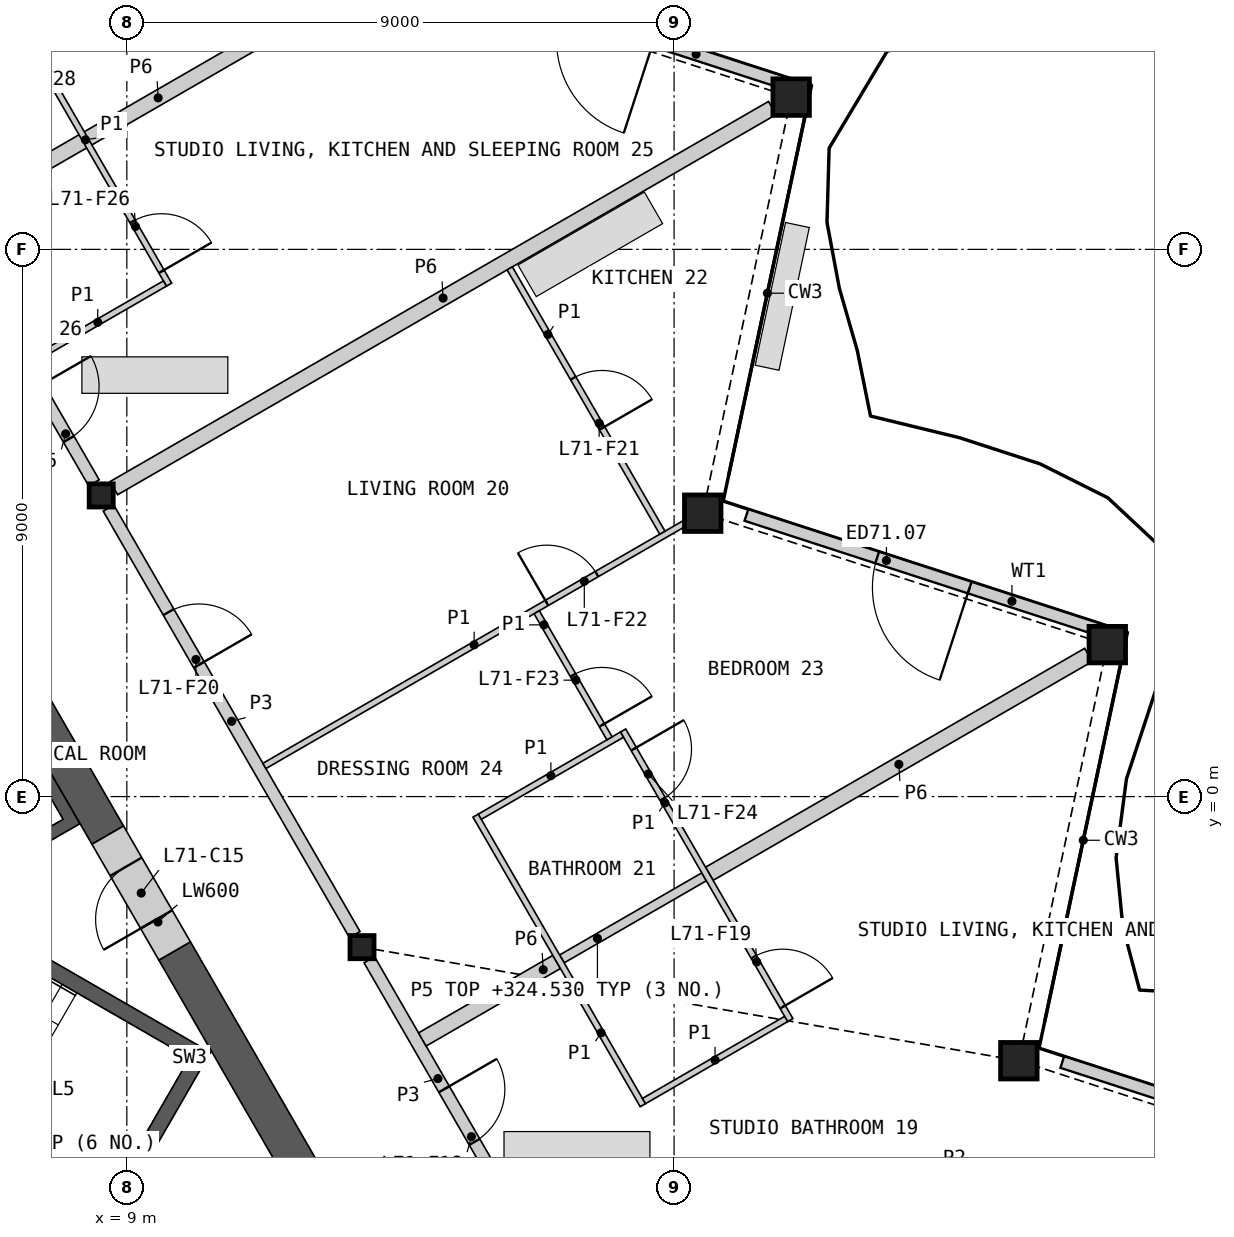
"""IFC4 building model, lengths in metres.
Left out: names, types, materials, properties, quantities, classifications, styles, units other than length and angle.
Written with IfcOpenShell. Run it as: python <this file> out.ifc"""

import sys

from ifc_helpers import new_model, si_unit, direction, frame, frame_2d, origin, origin_2d, place, context, subcontext, project, spatial, polyline, rectangle, hollow_rectangle, i_section, outline, extrude, element, fill, save


model = new_model("IFC4")
c1 = context("Model", 3, precision=1e-05, world=origin(), true_north=direction((0.0, 1.0)))
c2 = subcontext(c1, "Body", "Model", "MODEL_VIEW")
j1 = project(units=[si_unit("LENGTHUNIT", "METRE"), si_unit("PLANEANGLEUNIT", "RADIAN")], contexts=[c1])
p1 = place(None, origin())
s1 = spatial("IfcSite", under=j1, at=p1, CompositionType="ELEMENT")
p2 = place(p1, origin())
s2 = spatial("IfcBuilding", under=s1, at=p2, CompositionType="ELEMENT")
p3 = place(p2, frame((0.0, 0.0, 322.2)))
s3 = spatial("IfcBuildingStorey", under=s2, at=p3, CompositionType="ELEMENT", Elevation=322.2)
for number, where, z_axis, x_axis in (
    (1, (23.67, -4.344, 0.0), (0.0, 0.0, 1.0), (1.0, 0.0, 0.0)),
    (2, (25.125, 2.499, 0.0), (0.0, 0.0, 1.0), (1.0, 0.0, 0.0)),
    (3, (18.471, 4.661, 0.0), (0.0, 0.0, 1.0), (1.0, 0.0, 0.0)),
    (4, (19.926, 11.504, 0.0), (0.0, 0.0, 1.0), (1.0, 0.0, 0.0)),
):
    element("IfcColumn", number, at=place(p3, frame(where, z_axis=z_axis, x_axis=x_axis)), inside=s3, PredefinedType="COLUMN", context=c2, shape_type="SweptSolid", body=[
        extrude(hollow_rectangle(XDim=0.6, YDim=0.6, WallThickness=0.04, at=origin_2d()), origin(), (0.0, 0.0, 1.0), 3.4),
    ])
for number, where, z_axis, x_axis in (
    (5, (12.868, -2.476, 0.0), (0.0, 0.0, 1.0), (1.0, 0.0, 0.0)),
    (6, (8.578, 4.953, 0.0), (0.0, 0.0, 1.0), (1.0, 0.0, 0.0)),
):
    element("IfcColumn", number, at=place(p3, frame(where, z_axis=z_axis, x_axis=x_axis)), inside=s3, PredefinedType="COLUMN", context=c2, shape_type="SweptSolid", body=[
        extrude(i_section(OverallWidth=0.396, OverallDepth=0.381, WebThickness=0.019, FlangeThickness=0.03, at=origin_2d()), origin(), (0.0, 0.0, 1.0), 3.4),
    ])
p4 = place(p3, frame((30.207, -6.258, 0.0), z_axis=(0.0, 0.0, 1.0), x_axis=(-0.951056631566, 0.309016639608, 0.0)))
e7 = element("IfcWall", 7, at=p4, inside=s3, PredefinedType="SOLIDWALL", context=c2, shape_type="SweptSolid", body=[
    extrude(rectangle(XDim=6.122, YDim=0.2, at=frame_2d((3.061, 0.0))), origin(), (0.0, 0.0, 1.0), 2.488),
])
p5 = place(p4, frame((2.261, 0.0, 0.0)))
e8 = element("IfcOpeningElement", 8, at=p5, cuts=e7, PredefinedType="OPENING", context=c2, shape_type="SweptSolid", body=[
    extrude(rectangle(XDim=1.6, YDim=2.25, at=frame_2d((0.8, 1.125))), frame((0.0, 0.11, 0.0), z_axis=(0.0, -1.0, 0.0), x_axis=(1.0, 0.0, 0.0)), (0.0, 0.0, 1.0), 0.22),
])
p6 = place(p3, frame((25.012, 2.739, 0.0), z_axis=(0.0, 0.0, 1.0), x_axis=(-0.951056631566, 0.309016639608, 0.0)))
e9 = element("IfcWall", 9, at=p6, inside=s3, PredefinedType="SOLIDWALL", context=c2, shape_type="SweptSolid", body=[
    extrude(rectangle(XDim=6.122, YDim=0.2, at=frame_2d((3.061, 0.0))), origin(), (0.0, 0.0, 1.0), 2.488),
])
p7 = place(p6, frame((2.261, 0.0, 0.0)))
e10 = element("IfcOpeningElement", 10, at=p7, cuts=e9, PredefinedType="OPENING", context=c2, shape_type="SweptSolid", body=[
    extrude(rectangle(XDim=1.6, YDim=2.25, at=frame_2d((0.8, 1.125))), frame((0.0, 0.11, 0.0), z_axis=(0.0, -1.0, 0.0), x_axis=(1.0, 0.0, 0.0)), (0.0, 0.0, 1.0), 0.22),
])
p8 = place(p3, frame((19.817, 11.737, 0.0), z_axis=(0.0, 0.0, 1.0), x_axis=(-0.951056631566, 0.309016639608, 0.0)))
e11 = element("IfcWall", 11, at=p8, inside=s3, PredefinedType="SOLIDWALL", context=c2, shape_type="SweptSolid", body=[
    extrude(rectangle(XDim=6.122, YDim=0.2, at=frame_2d((3.061, 0.0))), origin(), (0.0, 0.0, 1.0), 2.488),
])
p9 = place(p8, frame((2.261, 0.0, 0.0)))
e12 = element("IfcOpeningElement", 12, at=p9, cuts=e11, PredefinedType="OPENING", context=c2, shape_type="SweptSolid", body=[
    extrude(rectangle(XDim=1.6, YDim=2.25, at=frame_2d((0.8, 1.125))), frame((0.0, 0.11, 0.0), z_axis=(0.0, -1.0, 0.0), x_axis=(1.0, 0.0, 0.0)), (0.0, 0.0, 1.0), 0.22),
])
p10 = place(p3, origin())
e13 = element("IfcWall", 13, at=p10, inside=s3, PredefinedType="SHEAR", context=c2, shape_type="SweptSolid", body=[
    extrude(outline(polyline([(1.561, 6.097), (3.731, 7.35), (8.231, -0.444), (6.061, -1.697), (5.96, -1.524), (7.952, -0.374), (6.952, 1.358), (4.96, 0.208), (4.861, 0.381), (6.852, 1.531), (5.852, 3.263), (3.861, 2.113), (3.76, 2.287), (5.752, 3.437), (4.752, 5.169), (2.76, 4.019), (2.66, 4.192), (4.652, 5.342), (3.652, 7.074), (1.66, 5.924), (1.561, 6.097)])), origin(), (0.0, 0.0, 1.0), 3.1),
])
p11 = place(p3, origin())
e14 = element("IfcWall", 14, at=p11, inside=s3, PredefinedType="SHEAR", context=c2, shape_type="SweptSolid", body=[
    extrude(outline(polyline([(3.763, -3.956), (8.83, -6.881), (8.738, -6.539), (3.888, -3.739), (3.763, -3.956)])), origin(), (0.0, 0.0, 1.0), 3.1),
])
p12 = place(p3, origin())
e15 = element("IfcWall", 15, at=p12, inside=s3, PredefinedType="SHEAR", context=c2, shape_type="SweptSolid", body=[
    extrude(outline(polyline([(8.83, -6.881), (10.374, -4.206), (10.032, -4.298), (8.738, -6.539), (8.83, -6.881)])), origin(), (0.0, 0.0, 1.0), 3.1),
])
p13 = place(p3, origin())
e16 = element("IfcWall", 16, at=p13, inside=s3, PredefinedType="SHEAR", context=c2, shape_type="SweptSolid", body=[
    extrude(outline(polyline([(10.032, -4.298), (10.374, -4.206), (5.307, -1.281), (5.182, -1.498), (10.032, -4.298)])), origin(), (0.0, 0.0, 1.0), 3.1),
])
p14 = place(p3, frame((8.686, -0.634, 0.0), z_axis=(0.0, 0.0, 1.0), x_axis=(-0.500004601921, 0.866022746848, 0.0)))
e17 = element("IfcWall", 17, at=p14, inside=s3, PredefinedType="SHEAR", context=c2, shape_type="SweptSolid", body=[
    extrude(rectangle(XDim=16.853, YDim=0.6, at=frame_2d((8.426, 0.0))), origin(), (0.0, 0.0, 1.0), 3.1),
])
p15 = place(p3, frame((12.221, -6.756, 0.0), z_axis=(0.0, 0.0, 1.0), x_axis=(-0.50000604952, 0.866021911064, 0.0)))
e18 = element("IfcWall", 18, at=p15, inside=s3, PredefinedType="SHEAR", context=c2, shape_type="SweptSolid", body=[
    extrude(rectangle(XDim=4.869, YDim=0.6, at=frame_2d((2.434, 0.0))), origin(), (0.0, 0.0, 1.0), 3.1),
])
p16 = place(p3, frame((9.786, -2.539, 0.0), z_axis=(0.0, 0.0, 1.0), x_axis=(-0.499981787252, 0.866035918664, 0.0)))
e19 = element("IfcWall", 19, at=p16, inside=s3, PredefinedType="SHEAR", context=c2, shape_type="SweptSolid", body=[
    extrude(rectangle(XDim=2.2, YDim=0.6, at=frame_2d((1.1, 0.0))), origin(), (0.0, 0.0, 1.0), 3.1),
])
p17 = place(p16, frame((0.6, 0.0, 0.0)))
e20 = element("IfcOpeningElement", 20, at=p17, cuts=e19, PredefinedType="OPENING", context=c2, shape_type="SweptSolid", body=[
    extrude(rectangle(XDim=1.0, YDim=2.1, at=frame_2d((0.5, 1.05))), frame((0.0, 0.31, 0.0), z_axis=(0.0, -1.0, 0.0), x_axis=(1.0, 0.0, 0.0)), (0.0, 0.0, 1.0), 0.62),
])
p18 = place(p3, frame((8.786, 5.073, 0.0), z_axis=(0.0, 0.0, 1.0), x_axis=(0.86602139559, 0.500006942333, 0.0)))
e21 = element("IfcWall", 21, at=p18, inside=s3, PredefinedType="PARTITIONING", context=c2, shape_type="SweptSolid", body=[
    extrude(rectangle(XDim=12.505, YDim=0.25, at=frame_2d((6.252, 0.0))), origin(), (0.0, 0.0, 1.0), 2.33),
])
p19 = place(p3, frame((4.409, 12.174, 0.0), z_axis=(0.0, 0.0, 1.0), x_axis=(0.499984266882, -0.866034487114, 0.0)))
e22 = element("IfcWall", 22, at=p19, inside=s3, PredefinedType="PARTITIONING", context=c2, shape_type="SweptSolid", body=[
    extrude(rectangle(XDim=8.099, YDim=0.2, at=frame_2d((4.049, 0.0))), origin(), (0.0, 0.0, 1.0), 3.1),
])
p20 = place(p19, frame((6.269, 0.0, 0.0)))
e23 = element("IfcOpeningElement", 23, at=p20, cuts=e22, PredefinedType="OPENING", context=c2, shape_type="SweptSolid", body=[
    extrude(rectangle(XDim=1.0, YDim=2.1, at=frame_2d((0.5, 1.05))), frame((0.0, 0.11, 0.0), z_axis=(0.0, -1.0, 0.0), x_axis=(1.0, 0.0, 0.0)), (0.0, 0.0, 1.0), 0.22),
])
p21 = place(p19, frame((1.164, 0.0, 0.0)))
e24 = element("IfcOpeningElement", 24, at=p21, cuts=e22, PredefinedType="OPENING", context=c2, shape_type="SweptSolid", body=[
    extrude(rectangle(XDim=1.0, YDim=2.1, at=frame_2d((0.5, 1.05))), frame((0.0, 0.11, 0.0), z_axis=(0.0, -1.0, 0.0), x_axis=(1.0, 0.0, 0.0)), (0.0, 0.0, 1.0), 0.22),
])
p22 = place(p3, frame((8.698, 4.745, 0.0), z_axis=(0.0, 0.0, 1.0), x_axis=(0.499984266882, -0.866034487114, 0.0)))
e25 = element("IfcWall", 25, at=p22, inside=s3, PredefinedType="PARTITIONING", context=c2, shape_type="SweptSolid", body=[
    extrude(rectangle(XDim=8.099, YDim=0.2, at=frame_2d((4.049, 0.0))), origin(), (0.0, 0.0, 1.0), 3.1),
])
p23 = place(p22, frame((1.976, 0.0, 0.0)))
e26 = element("IfcOpeningElement", 26, at=p23, cuts=e25, PredefinedType="OPENING", context=c2, shape_type="SweptSolid", body=[
    extrude(rectangle(XDim=1.0, YDim=2.1, at=frame_2d((0.5, 1.05))), frame((0.0, 0.11, 0.0), z_axis=(0.0, -1.0, 0.0), x_axis=(1.0, 0.0, 0.0)), (0.0, 0.0, 1.0), 0.22),
])
p24 = place(p3, frame((6.068, 9.501, 0.0), z_axis=(0.0, 0.0, 1.0), x_axis=(0.866022671543, 0.50000473235, 0.0)))
e27 = element("IfcWall", 27, at=p24, inside=s3, PredefinedType="PARTITIONING", context=c2, shape_type="SweptSolid", body=[
    extrude(rectangle(XDim=7.961, YDim=0.25, at=frame_2d((3.98, 0.0))), origin(), (0.0, 0.0, 1.0), 2.33),
])
p25 = place(p3, frame((18.58, -1.27, 0.0), z_axis=(0.0, 0.0, 1.0), x_axis=(0.866024647952, 0.500001309137, 0.0)))
e28 = element("IfcWall", 28, at=p25, inside=s3, PredefinedType="PARTITIONING", context=c2, shape_type="SweptSolid", body=[
    extrude(rectangle(XDim=7.2, YDim=0.25, at=frame_2d((3.6, 0.0))), origin(), (0.0, 0.0, 1.0), 2.33),
])
p26 = place(p3, frame((12.988, -2.684, 0.0), z_axis=(0.0, 0.0, 1.0), x_axis=(0.49999094734, -0.866030630277, 0.0)))
e29 = element("IfcWall", 29, at=p26, inside=s3, PredefinedType="PARTITIONING", context=c2, shape_type="SweptSolid", body=[
    extrude(rectangle(XDim=4.513, YDim=0.2, at=frame_2d((2.256, 0.0))), origin(), (0.0, 0.0, 1.0), 3.1),
])
p27 = place(p26, frame((2.459, 0.0, 0.0)))
e30 = element("IfcOpeningElement", 30, at=p27, cuts=e29, PredefinedType="OPENING", context=c2, shape_type="SweptSolid", body=[
    extrude(rectangle(XDim=1.0, YDim=2.1, at=frame_2d((0.5, 1.05))), frame((0.0, 0.11, 0.0), z_axis=(0.0, -1.0, 0.0), x_axis=(1.0, 0.0, 0.0)), (0.0, 0.0, 1.0), 0.22),
])
p28 = place(p3, frame((13.86, -3.995, 0.0), z_axis=(0.0, 0.0, 1.0), x_axis=(0.866030925526, 0.499990435942, 0.0)))
e31 = element("IfcWall", 31, at=p28, inside=s3, PredefinedType="PARTITIONING", context=c2, shape_type="SweptSolid", body=[
    extrude(rectangle(XDim=2.55, YDim=0.25, at=frame_2d((1.275, 0.0))), origin(), (0.0, 0.0, 1.0), 2.33),
])
p29 = place(p3, frame((16.155, -2.67, 0.0), z_axis=(0.0, 0.0, 1.0), x_axis=(0.86599734893, 0.500048589285, 0.0)))
e32 = element("IfcWall", 32, at=p29, inside=s3, PredefinedType="PLUMBINGWALL", context=c2, shape_type="SweptSolid", body=[
    extrude(rectangle(XDim=2.7, YDim=0.15, at=frame_2d((1.35, 0.0))), origin(), (0.0, 0.0, 1.0), 2.33),
])
p30 = place(p3, frame((11.262, 0.504, 0.0), z_axis=(0.0, 0.0, 1.0), x_axis=(0.866020217342, 0.500008983073, 0.0)))
e33 = element("IfcWall", 33, at=p30, inside=s3, PredefinedType="PARTITIONING", context=c2, shape_type="SweptSolid", body=[
    extrude(rectangle(XDim=7.966, YDim=0.1, at=frame_2d((3.983, 0.0))), origin(), (0.0, 0.0, 1.0), 2.33),
])
p31 = place(p30, frame((5.362, 0.0, 0.0)))
e34 = element("IfcOpeningElement", 34, at=p31, cuts=e33, PredefinedType="OPENING", context=c2, shape_type="SweptSolid", body=[
    extrude(rectangle(XDim=0.95, YDim=2.1, at=frame_2d((0.475, 1.05))), frame((0.0, 0.06, 0.0), z_axis=(0.0, -1.0, 0.0), x_axis=(1.0, 0.0, 0.0)), (0.0, 0.0, 1.0), 0.12),
])
p32 = place(p3, frame((17.161, 1.087, 0.0), z_axis=(0.0, 0.0, 1.0), x_axis=(0.499996545922, -0.866027397988, 0.0)))
e35 = element("IfcWall", 35, at=p32, inside=s3, PredefinedType="PARTITIONING", context=c2, shape_type="SweptSolid", body=[
    extrude(rectangle(XDim=5.5, YDim=0.1, at=frame_2d((2.75, 0.0))), origin(), (0.0, 0.0, 1.0), 2.33),
])
p33 = place(p32, frame((4.3, 0.0, 0.0)))
e36 = element("IfcOpeningElement", 36, at=p33, cuts=e35, PredefinedType="OPENING", context=c2, shape_type="SweptSolid", body=[
    extrude(rectangle(XDim=0.95, YDim=2.1, at=frame_2d((0.475, 1.05))), frame((0.0, 0.06, 0.0), z_axis=(0.0, -1.0, 0.0), x_axis=(1.0, 0.0, 0.0)), (0.0, 0.0, 1.0), 0.12),
])
p34 = place(p32, frame((0.351, 0.0, 0.0)))
e37 = element("IfcOpeningElement", 37, at=p34, cuts=e35, PredefinedType="OPENING", context=c2, shape_type="SweptSolid", body=[
    extrude(rectangle(XDim=0.95, YDim=2.1, at=frame_2d((0.475, 1.05))), frame((0.0, 0.06, 0.0), z_axis=(0.0, -1.0, 0.0), x_axis=(1.0, 0.0, 0.0)), (0.0, 0.0, 1.0), 0.12),
])
p35 = place(p3, frame((14.736, -0.313, 0.0), z_axis=(0.0, 0.0, 1.0), x_axis=(0.49997732567, -0.866038494419, 0.0)))
e38 = element("IfcWall", 38, at=p35, inside=s3, PredefinedType="PARTITIONING", context=c2, shape_type="SweptSolid", body=[
    extrude(rectangle(XDim=5.5, YDim=0.1, at=frame_2d((2.75, 0.0))), origin(), (0.0, 0.0, 1.0), 2.33),
])
p36 = place(p3, frame((6.944, 13.183, 0.0), z_axis=(0.0, 0.0, 1.0), x_axis=(0.499996545922, -0.866027397988, 0.0)))
e39 = element("IfcWall", 39, at=p36, inside=s3, PredefinedType="PARTITIONING", context=c2, shape_type="SweptSolid", body=[
    extrude(rectangle(XDim=5.5, YDim=0.1, at=frame_2d((2.75, 0.0))), origin(), (0.0, 0.0, 1.0), 2.33),
])
p37 = place(p36, frame((4.3, 0.0, 0.0)))
e40 = element("IfcOpeningElement", 40, at=p37, cuts=e39, PredefinedType="OPENING", context=c2, shape_type="SweptSolid", body=[
    extrude(rectangle(XDim=0.95, YDim=2.1, at=frame_2d((0.475, 1.05))), frame((0.0, 0.06, 0.0), z_axis=(0.0, -1.0, 0.0), x_axis=(1.0, 0.0, 0.0)), (0.0, 0.0, 1.0), 0.12),
])
p38 = place(p36, frame((0.25, 0.0, 0.0)))
e41 = element("IfcOpeningElement", 41, at=p38, cuts=e39, PredefinedType="OPENING", context=c2, shape_type="SweptSolid", body=[
    extrude(rectangle(XDim=0.95, YDim=2.1, at=frame_2d((0.475, 1.05))), frame((0.0, 0.06, 0.0), z_axis=(0.0, -1.0, 0.0), x_axis=(1.0, 0.0, 0.0)), (0.0, 0.0, 1.0), 0.12),
])
p39 = place(p3, frame((15.297, 8.688, 0.0), z_axis=(0.0, 0.0, 1.0), x_axis=(0.499989096993, -0.866031698547, 0.0)))
e42 = element("IfcWall", 42, at=p39, inside=s3, PredefinedType="PARTITIONING", context=c2, shape_type="SweptSolid", body=[
    extrude(rectangle(XDim=5.02, YDim=0.1, at=frame_2d((2.51, 0.0))), origin(), (0.0, 0.0, 1.0), 2.33),
])
p40 = place(p39, frame((2.086, 0.0, 0.0)))
e43 = element("IfcOpeningElement", 43, at=p40, cuts=e42, PredefinedType="OPENING", context=c2, shape_type="SweptSolid", body=[
    extrude(rectangle(XDim=0.95, YDim=2.1, at=frame_2d((0.475, 1.05))), frame((0.0, 0.06, 0.0), z_axis=(0.0, -1.0, 0.0), x_axis=(1.0, 0.0, 0.0)), (0.0, 0.0, 1.0), 0.12),
])
p41 = place(p3, frame((17.505, -5.008, 0.0), z_axis=(0.0, 0.0, 1.0), x_axis=(0.866019956843, 0.50000943426, 0.0)))
e44 = element("IfcWall", 44, at=p41, inside=s3, PredefinedType="PARTITIONING", context=c2, shape_type="SweptSolid", body=[
    extrude(rectangle(XDim=2.7, YDim=0.1, at=frame_2d((1.35, 0.0))), origin(), (0.0, 0.0, 1.0), 2.33),
])
p42 = place(p3, frame((14.805, -0.331, 0.0), z_axis=(0.0, 0.0, 1.0), x_axis=(0.866059108428, 0.4999416173, 0.0)))
e45 = element("IfcWall", 45, at=p42, inside=s3, PredefinedType="PARTITIONING", context=c2, shape_type="SweptSolid", body=[
    extrude(rectangle(XDim=2.7, YDim=0.1, at=frame_2d((1.35, 0.0))), origin(), (0.0, 0.0, 1.0), 2.33),
])
p43 = place(p3, frame((7.418, 7.163, 0.0), z_axis=(0.0, 0.0, 1.0), x_axis=(0.866054858364, 0.499948979701, 0.0)))
e46 = element("IfcWall", 46, at=p43, inside=s3, PredefinedType="PARTITIONING", context=c2, shape_type="SweptSolid", body=[
    extrude(rectangle(XDim=2.55, YDim=0.1, at=frame_2d((1.275, 0.0))), origin(), (0.0, 0.0, 1.0), 2.33),
])
p44 = place(p3, frame((15.74, 3.032, 0.0), z_axis=(0.0, 0.0, 1.0), x_axis=(0.500075453945, -0.865981836046, 0.0)))
e47 = element("IfcWall", 47, at=p44, inside=s3, PredefinedType="PARTITIONING", context=c2, shape_type="SweptSolid", body=[
    extrude(rectangle(XDim=2.395, YDim=0.1, at=frame_2d((1.197, 0.0))), origin(), (0.0, 0.0, 1.0), 2.33),
])
p45 = place(p44, frame((1.195, 0.0, 0.0)))
e48 = element("IfcOpeningElement", 48, at=p45, cuts=e47, PredefinedType="OPENING", context=c2, shape_type="SweptSolid", body=[
    extrude(rectangle(XDim=0.95, YDim=2.1, at=frame_2d((0.475, 1.05))), frame((0.0, 0.06, 0.0), z_axis=(0.0, -1.0, 0.0), x_axis=(1.0, 0.0, 0.0)), (0.0, 0.0, 1.0), 0.12),
])
p46 = place(p7, origin())
e49 = element("IfcDoor", 49, at=p46, inside=s3, OperationType="DOUBLE_DOOR_SINGLE_SWING", PredefinedType="DOOR", context=c2, shape_type="SweptSolid", body=[
    extrude(rectangle(XDim=1.6, YDim=2.25, at=frame_2d((0.8, 1.125))), frame((0.0, 0.025, 0.0), z_axis=(0.0, -1.0, 0.0), x_axis=(1.0, 0.0, 0.0)), (0.0, 0.0, 1.0), 0.05),
])
fill(e10, e49)
p47 = place(p17, origin())
e50 = element("IfcDoor", 50, at=p47, inside=s3, OperationType="SINGLE_SWING_LEFT", PredefinedType="DOOR", context=c2, shape_type="SweptSolid", body=[
    extrude(rectangle(XDim=1.0, YDim=2.1, at=frame_2d((0.5, 1.05))), frame((0.0, 0.055, 0.0), z_axis=(0.0, -1.0, 0.0), x_axis=(1.0, 0.0, 0.0)), (0.0, 0.0, 1.0), 0.05),
])
fill(e20, e50)
p48 = place(p27, origin())
e51 = element("IfcDoor", 51, at=p48, inside=s3, OperationType="SINGLE_SWING_LEFT", PredefinedType="DOOR", context=c2, shape_type="SweptSolid", body=[
    extrude(rectangle(XDim=1.0, YDim=2.1, at=frame_2d((0.5, 1.05))), frame((0.0, 0.025, 0.0), z_axis=(0.0, -1.0, 0.0), x_axis=(1.0, 0.0, 0.0)), (0.0, 0.0, 1.0), 0.05),
])
fill(e30, e51)
p49 = place(p33, origin())
e52 = element("IfcDoor", 52, at=p49, inside=s3, OperationType="SINGLE_SWING_RIGHT", PredefinedType="DOOR", context=c2, shape_type="SweptSolid", body=[
    extrude(rectangle(XDim=0.95, YDim=2.1, at=frame_2d((0.475, 1.05))), frame((0.0, 0.025, 0.0), z_axis=(0.0, -1.0, 0.0), x_axis=(1.0, 0.0, 0.0)), (0.0, 0.0, 1.0), 0.05),
])
fill(e36, e52)
p50 = place(p23, origin())
e53 = element("IfcDoor", 53, at=p50, inside=s3, OperationType="SINGLE_SWING_RIGHT", PredefinedType="DOOR", context=c2, shape_type="SweptSolid", body=[
    extrude(rectangle(XDim=1.0, YDim=2.1, at=frame_2d((0.5, 1.05))), frame((0.0, 0.025, 0.0), z_axis=(0.0, -1.0, 0.0), x_axis=(1.0, 0.0, 0.0)), (0.0, 0.0, 1.0), 0.05),
])
fill(e26, e53)
p51 = place(p40, origin())
e54 = element("IfcDoor", 54, at=p51, inside=s3, OperationType="SINGLE_SWING_RIGHT", PredefinedType="DOOR", context=c2, shape_type="SweptSolid", body=[
    extrude(rectangle(XDim=0.95, YDim=2.1, at=frame_2d((0.475, 1.05))), frame((0.0, 0.025, 0.0), z_axis=(0.0, -1.0, 0.0), x_axis=(1.0, 0.0, 0.0)), (0.0, 0.0, 1.0), 0.05),
])
fill(e43, e54)
p52 = place(p31, origin())
e55 = element("IfcDoor", 55, at=p52, inside=s3, OperationType="SINGLE_SWING_LEFT", PredefinedType="DOOR", context=c2, shape_type="SweptSolid", body=[
    extrude(rectangle(XDim=0.95, YDim=2.1, at=frame_2d((0.475, 1.05))), frame((0.0, 0.025, 0.0), z_axis=(0.0, -1.0, 0.0), x_axis=(1.0, 0.0, 0.0)), (0.0, 0.0, 1.0), 0.05),
])
fill(e34, e55)
p53 = place(p45, origin())
e56 = element("IfcDoor", 56, at=p53, inside=s3, OperationType="SINGLE_SWING_RIGHT", PredefinedType="DOOR", context=c2, shape_type="SweptSolid", body=[
    extrude(rectangle(XDim=0.95, YDim=2.1, at=frame_2d((0.475, 1.05))), frame((0.0, 0.025, 0.0), z_axis=(0.0, -1.0, 0.0), x_axis=(1.0, 0.0, 0.0)), (0.0, 0.0, 1.0), 0.05),
])
fill(e48, e56)
p54 = place(p34, origin())
e57 = element("IfcDoor", 57, at=p54, inside=s3, OperationType="SINGLE_SWING_LEFT", PredefinedType="DOOR", context=c2, shape_type="SweptSolid", body=[
    extrude(rectangle(XDim=0.95, YDim=2.1, at=frame_2d((0.475, 1.05))), frame((0.0, 0.025, 0.0), z_axis=(0.0, -1.0, 0.0), x_axis=(1.0, 0.0, 0.0)), (0.0, 0.0, 1.0), 0.05),
])
fill(e37, e57)
p55 = place(p20, origin())
e58 = element("IfcDoor", 58, at=p55, inside=s3, OperationType="SINGLE_SWING_LEFT", PredefinedType="DOOR", context=c2, shape_type="SweptSolid", body=[
    extrude(rectangle(XDim=1.0, YDim=2.1, at=frame_2d((0.5, 1.05))), frame((0.0, 0.025, 0.0), z_axis=(0.0, -1.0, 0.0), x_axis=(1.0, 0.0, 0.0)), (0.0, 0.0, 1.0), 0.05),
])
fill(e23, e58)
p56 = place(p37, origin())
e59 = element("IfcDoor", 59, at=p56, inside=s3, OperationType="SINGLE_SWING_RIGHT", PredefinedType="DOOR", context=c2, shape_type="SweptSolid", body=[
    extrude(rectangle(XDim=0.95, YDim=2.1, at=frame_2d((0.475, 1.05))), frame((0.0, 0.025, 0.0), z_axis=(0.0, -1.0, 0.0), x_axis=(1.0, 0.0, 0.0)), (0.0, 0.0, 1.0), 0.05),
])
fill(e40, e59)
save(model, sys.argv[1])
